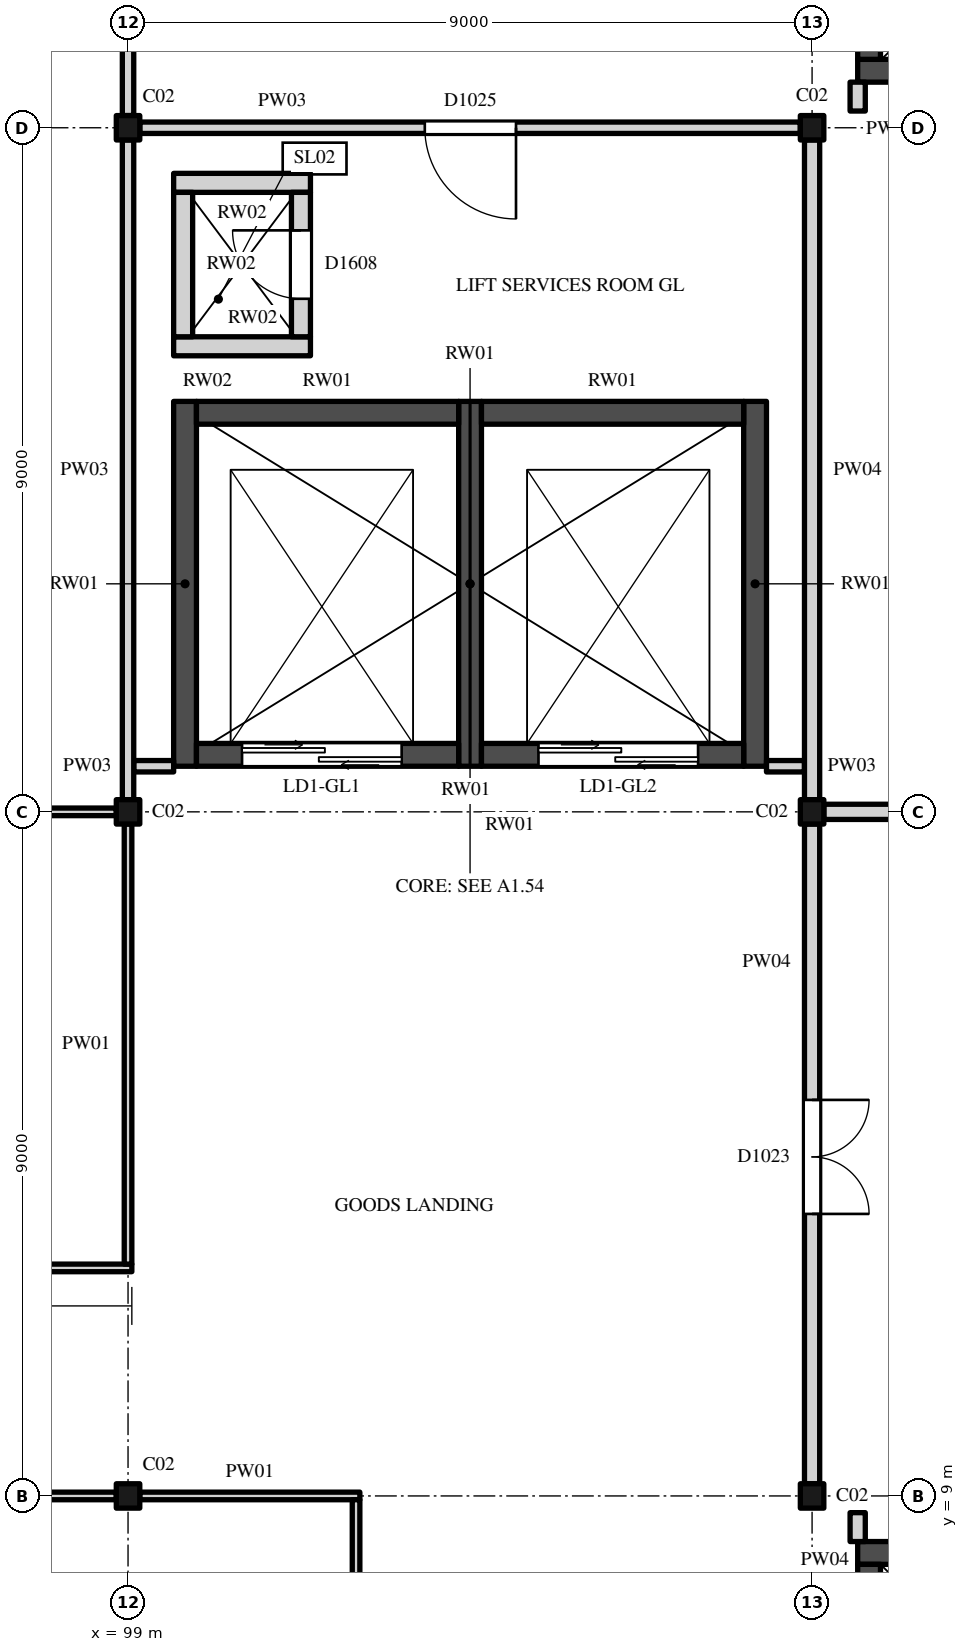
"""IFC4 building model, lengths in metres.
Left out: names, types, materials, properties, quantities, classifications, styles, units other than length and angle.
Written with IfcOpenShell. Run it as: python <this file> out.ifc"""

import sys

from ifc_helpers import new_model, si_unit, direction, frame, frame_2d, origin, origin_2d, place, context, subcontext, project, spatial, rectangle, i_section, extrude, element, fill, save


model = new_model("IFC4")
c1 = context("Model", 3, precision=1e-05, world=origin(), true_north=direction((0.0, 1.0)))
c2 = subcontext(c1, "Body", "Model", "MODEL_VIEW")
j1 = project(units=[si_unit("LENGTHUNIT", "METRE"), si_unit("PLANEANGLEUNIT", "RADIAN")], contexts=[c1])
p1 = place(None, origin())
s1 = spatial("IfcSite", under=j1, at=p1, CompositionType="ELEMENT")
p2 = place(p1, origin())
s2 = spatial("IfcBuilding", under=s1, at=p2, CompositionType="ELEMENT")
p3 = place(p2, frame((0.0, 0.0, 6.0)))
s3 = spatial("IfcBuildingStorey", under=s2, at=p3, CompositionType="ELEMENT", Elevation=6.0)
for number, where, z_axis, x_axis in (
    (1, (99.0, 9.0, 0.0), (0.0, 0.0, 1.0), (1.0, 0.0, 0.0)),
    (2, (108.0, 9.0, 0.0), (0.0, 0.0, 1.0), (1.0, 0.0, 0.0)),
    (3, (99.0, 18.0, 0.0), (0.0, 0.0, 1.0), (1.0, 0.0, 0.0)),
    (4, (108.0, 18.0, 0.0), (0.0, 0.0, 1.0), (1.0, 0.0, 0.0)),
    (5, (99.0, 27.0, 0.0), (0.0, 0.0, 1.0), (1.0, 0.0, 0.0)),
    (6, (108.0, 27.0, 0.0), (0.0, 0.0, 1.0), (1.0, 0.0, 0.0)),
):
    element("IfcColumn", number, at=place(p3, frame(where, z_axis=z_axis, x_axis=x_axis)), inside=s3, PredefinedType="COLUMN", context=c2, shape_type="SweptSolid", body=[
        extrude(i_section(OverallWidth=0.309, OverallDepth=0.321, WebThickness=0.014, FlangeThickness=0.022, FilletRadius=0.017, at=origin_2d()), origin(), (0.0, 0.0, 1.0), 5.0),
    ])
p4 = place(p3, frame((108.6, 8.25, 0.0), z_axis=(0.0, 0.0, 1.0), x_axis=(1.0, 0.0, 0.0)))
e7 = element("IfcWall", 7, at=p4, inside=s3, PredefinedType="SHEAR", context=c2, shape_type="SweptSolid", body=[
    extrude(rectangle(XDim=8.1, YDim=0.3, at=frame_2d((4.05, 0.0))), origin(), (0.0, 0.0, 1.0), 5.0),
])
p5 = place(p3, frame((108.75, 0.3, 0.0), z_axis=(0.0, 0.0, 1.0), x_axis=(0.0, 1.0, 0.0)))
e8 = element("IfcWall", 8, at=p5, inside=s3, PredefinedType="SHEAR", context=c2, shape_type="SweptSolid", body=[
    extrude(rectangle(XDim=7.8, YDim=0.3, at=frame_2d((3.9, 0.0))), origin(), (0.0, 0.0, 1.0), 5.0),
])
p6 = place(p5, frame((3.6, 0.0, 0.0)))
e9 = element("IfcOpeningElement", 9, at=p6, cuts=e8, PredefinedType="OPENING", context=c2, shape_type="SweptSolid", body=[
    extrude(rectangle(XDim=1.2, YDim=2.1, at=frame_2d((0.6, 1.05))), frame((0.0, 0.16, 0.0), z_axis=(0.0, -1.0, 0.0), x_axis=(1.0, 0.0, 0.0)), (0.0, 0.0, 1.0), 0.32),
])
p7 = place(p3, frame((108.6, 27.75, 0.0), z_axis=(0.0, 0.0, 1.0), x_axis=(1.0, 0.0, 0.0)))
e10 = element("IfcWall", 10, at=p7, inside=s3, PredefinedType="SHEAR", context=c2, shape_type="SweptSolid", body=[
    extrude(rectangle(XDim=8.1, YDim=0.3, at=frame_2d((4.05, 0.0))), origin(), (0.0, 0.0, 1.0), 5.0),
])
p8 = place(p3, frame((108.75, 27.9, 0.0), z_axis=(0.0, 0.0, 1.0), x_axis=(0.0, 1.0, 0.0)))
e11 = element("IfcWall", 11, at=p8, inside=s3, PredefinedType="SHEAR", context=c2, shape_type="SweptSolid", body=[
    extrude(rectangle(XDim=7.2, YDim=0.3, at=frame_2d((3.6, 0.0))), origin(), (0.0, 0.0, 1.0), 5.0),
])
p9 = place(p8, frame((3.0, 0.0, 0.0)))
e12 = element("IfcOpeningElement", 12, at=p9, cuts=e11, PredefinedType="OPENING", context=c2, shape_type="SweptSolid", body=[
    extrude(rectangle(XDim=1.2, YDim=2.1, at=frame_2d((0.6, 1.05))), frame((0.0, 0.16, 0.0), z_axis=(0.0, -1.0, 0.0), x_axis=(1.0, 0.0, 0.0)), (0.0, 0.0, 1.0), 0.32),
])
for number, where, z_axis, x_axis in (
    (13, (99.75, 18.6, 0.0), (0.0, 0.0, 1.0), (0.0, 1.0, 0.0)),
    (14, (103.5, 18.6, 0.0), (0.0, 0.0, 1.0), (0.0, 1.0, 0.0)),
    (15, (107.25, 18.6, 0.0), (0.0, 0.0, 1.0), (0.0, 1.0, 0.0)),
):
    element("IfcWall", number, at=place(p3, frame(where, z_axis=z_axis, x_axis=x_axis)), inside=s3, PredefinedType="SHEAR", context=c2, shape_type="SweptSolid", body=[
        extrude(rectangle(XDim=4.8, YDim=0.3, at=frame_2d((2.4, 0.0))), origin(), (0.0, 0.0, 1.0), 5.0),
    ])
p10 = place(p3, frame((99.9, 18.75, 0.0), z_axis=(0.0, 0.0, 1.0), x_axis=(1.0, 0.0, 0.0)))
e16 = element("IfcWall", 16, at=p10, inside=s3, PredefinedType="SHEAR", context=c2, shape_type="SweptSolid", body=[
    extrude(rectangle(XDim=3.45, YDim=0.3, at=frame_2d((1.725, 0.0))), origin(), (0.0, 0.0, 1.0), 5.0),
])
p11 = place(p10, frame((0.6, 0.0, 0.0)))
e17 = element("IfcOpeningElement", 17, at=p11, cuts=e16, PredefinedType="OPENING", context=c2, shape_type="SweptSolid", body=[
    extrude(rectangle(XDim=2.1, YDim=2.4, at=frame_2d((1.05, 1.2))), frame((0.0, 0.16, 0.0), z_axis=(0.0, -1.0, 0.0), x_axis=(1.0, 0.0, 0.0)), (0.0, 0.0, 1.0), 0.32),
])
p12 = place(p3, frame((99.9, 23.25, 0.0), z_axis=(0.0, 0.0, 1.0), x_axis=(1.0, 0.0, 0.0)))
e18 = element("IfcWall", 18, at=p12, inside=s3, PredefinedType="SHEAR", context=c2, shape_type="SweptSolid", body=[
    extrude(rectangle(XDim=3.45, YDim=0.3, at=frame_2d((1.725, 0.0))), origin(), (0.0, 0.0, 1.0), 5.0),
])
p13 = place(p3, frame((103.65, 18.75, 0.0), z_axis=(0.0, 0.0, 1.0), x_axis=(1.0, 0.0, 0.0)))
e19 = element("IfcWall", 19, at=p13, inside=s3, PredefinedType="SHEAR", context=c2, shape_type="SweptSolid", body=[
    extrude(rectangle(XDim=3.45, YDim=0.3, at=frame_2d((1.725, 0.0))), origin(), (0.0, 0.0, 1.0), 5.0),
])
p14 = place(p13, frame((0.75, 0.0, 0.0)))
e20 = element("IfcOpeningElement", 20, at=p14, cuts=e19, PredefinedType="OPENING", context=c2, shape_type="SweptSolid", body=[
    extrude(rectangle(XDim=2.1, YDim=2.4, at=frame_2d((1.05, 1.2))), frame((0.0, 0.16, 0.0), z_axis=(0.0, -1.0, 0.0), x_axis=(1.0, 0.0, 0.0)), (0.0, 0.0, 1.0), 0.32),
])
p15 = place(p3, frame((103.65, 23.25, 0.0), z_axis=(0.0, 0.0, 1.0), x_axis=(1.0, 0.0, 0.0)))
e21 = element("IfcWall", 21, at=p15, inside=s3, PredefinedType="SHEAR", context=c2, shape_type="SweptSolid", body=[
    extrude(rectangle(XDim=3.45, YDim=0.3, at=frame_2d((1.725, 0.0))), origin(), (0.0, 0.0, 1.0), 5.0),
])
for number, where, z_axis, x_axis in (
    (22, (99.6, 24.125, 0.0), (0.0, 0.0, 1.0), (1.0, 0.0, 0.0)),
    (23, (99.6, 26.275, 0.0), (0.0, 0.0, 1.0), (1.0, 0.0, 0.0)),
):
    element("IfcWall", number, at=place(p3, frame(where, z_axis=z_axis, x_axis=x_axis)), inside=s3, PredefinedType="STANDARD", context=c2, shape_type="SweptSolid", body=[
        extrude(rectangle(XDim=1.8, YDim=0.25, at=frame_2d((0.9, 0.0))), origin(), (0.0, 0.0, 1.0), 5.0),
    ])
p16 = place(p3, frame((99.725, 24.25, 0.0), z_axis=(0.0, 0.0, 1.0), x_axis=(0.0, 1.0, 0.0)))
e24 = element("IfcWall", 24, at=p16, inside=s3, PredefinedType="STANDARD", context=c2, shape_type="SweptSolid", body=[
    extrude(rectangle(XDim=1.9, YDim=0.25, at=frame_2d((0.95, 0.0))), origin(), (0.0, 0.0, 1.0), 5.0),
])
p17 = place(p3, frame((101.275, 24.25, 0.0), z_axis=(0.0, 0.0, 1.0), x_axis=(0.0, 1.0, 0.0)))
e25 = element("IfcWall", 25, at=p17, inside=s3, PredefinedType="STANDARD", context=c2, shape_type="SweptSolid", body=[
    extrude(rectangle(XDim=1.9, YDim=0.25, at=frame_2d((0.95, 0.0))), origin(), (0.0, 0.0, 1.0), 5.0),
])
p18 = place(p17, frame((0.5, 0.0, 0.0)))
e26 = element("IfcOpeningElement", 26, at=p18, cuts=e25, PredefinedType="OPENING", context=c2, shape_type="SweptSolid", body=[
    extrude(rectangle(XDim=0.9, YDim=2.1, at=frame_2d((0.45, 1.05))), frame((0.0, 0.135, 0.0), z_axis=(0.0, -1.0, 0.0), x_axis=(1.0, 0.0, 0.0)), (0.0, 0.0, 1.0), 0.27),
])
p19 = place(p3, frame((90.155, 9.0, 0.0), z_axis=(0.0, 0.0, 1.0), x_axis=(1.0, 0.0, 0.0)))
e27 = element("IfcWall", 27, at=p19, inside=s3, PredefinedType="PARTITIONING", context=c2, shape_type="SweptSolid", body=[
    extrude(rectangle(XDim=8.691, YDim=0.1, at=frame_2d((4.345, 0.0))), origin(), (0.0, 0.0, 1.0), 4.419),
])
p20 = place(p19, frame((3.65, 0.0, 0.0)))
e28 = element("IfcOpeningElement", 28, at=p20, cuts=e27, PredefinedType="OPENING", context=c2, shape_type="SweptSolid", body=[
    extrude(rectangle(XDim=1.35, YDim=2.4, at=frame_2d((0.675, 1.2))), frame((0.0, 0.06, 0.0), z_axis=(0.0, -1.0, 0.0), x_axis=(1.0, 0.0, 0.0)), (0.0, 0.0, 1.0), 0.12),
])
p21 = place(p3, frame((99.155, 9.0, 0.0), z_axis=(0.0, 0.0, 1.0), x_axis=(1.0, 0.0, 0.0)))
e29 = element("IfcWall", 29, at=p21, inside=s3, PredefinedType="PARTITIONING", context=c2, shape_type="SweptSolid", body=[
    extrude(rectangle(XDim=2.896, YDim=0.1, at=frame_2d((1.448, 0.0))), origin(), (0.0, 0.0, 1.0), 4.419),
])
p22 = place(p3, frame((63.1, 12.0, 0.0), z_axis=(0.0, 0.0, 1.0), x_axis=(1.0, 0.0, 0.0)))
e30 = element("IfcWall", 30, at=p22, inside=s3, PredefinedType="PARTITIONING", context=c2, shape_type="SweptSolid", body=[
    extrude(rectangle(XDim=35.95, YDim=0.1, at=frame_2d((17.975, 0.0))), origin(), (0.0, 0.0, 1.0), 4.419),
])
p23 = place(p22, frame((8.25, 0.0, 0.0)))
e31 = element("IfcOpeningElement", 31, at=p23, cuts=e30, PredefinedType="OPENING", context=c2, shape_type="SweptSolid", body=[
    extrude(rectangle(XDim=1.35, YDim=2.4, at=frame_2d((0.675, 1.2))), frame((0.0, 0.06, 0.0), z_axis=(0.0, -1.0, 0.0), x_axis=(1.0, 0.0, 0.0)), (0.0, 0.0, 1.0), 0.12),
])
p24 = place(p22, frame((26.25, 0.0, 0.0)))
e32 = element("IfcOpeningElement", 32, at=p24, cuts=e30, PredefinedType="OPENING", context=c2, shape_type="SweptSolid", body=[
    extrude(rectangle(XDim=1.35, YDim=2.4, at=frame_2d((0.675, 1.2))), frame((0.0, 0.06, 0.0), z_axis=(0.0, -1.0, 0.0), x_axis=(1.0, 0.0, 0.0)), (0.0, 0.0, 1.0), 0.12),
])
p25 = place(p3, frame((90.155, 18.0, 0.0), z_axis=(0.0, 0.0, 1.0), x_axis=(1.0, 0.0, 0.0)))
e33 = element("IfcWall", 33, at=p25, inside=s3, PredefinedType="PARTITIONING", context=c2, shape_type="SweptSolid", body=[
    extrude(rectangle(XDim=8.691, YDim=0.1, at=frame_2d((4.345, 0.0))), origin(), (0.0, 0.0, 1.0), 4.419),
])
p26 = place(p3, frame((108.155, 18.0, 0.0), z_axis=(0.0, 0.0, 1.0), x_axis=(1.0, 0.0, 0.0)))
e34 = element("IfcWall", 34, at=p26, inside=s3, PredefinedType="PARTITIONING", context=c2, shape_type="SweptSolid", body=[
    extrude(rectangle(XDim=8.545, YDim=0.2, at=frame_2d((4.273, 0.0))), origin(), (0.0, 0.0, 1.0), 4.419),
])
p27 = place(p26, frame((3.55, 0.0, 0.0)))
e35 = element("IfcOpeningElement", 35, at=p27, cuts=e34, PredefinedType="OPENING", context=c2, shape_type="SweptSolid", body=[
    extrude(rectangle(XDim=1.5, YDim=2.4, at=frame_2d((0.75, 1.2))), frame((0.0, 0.11, 0.0), z_axis=(0.0, -1.0, 0.0), x_axis=(1.0, 0.0, 0.0)), (0.0, 0.0, 1.0), 0.22),
])
p28 = place(p3, frame((99.075, 18.6, 0.0), z_axis=(0.0, 0.0, 1.0), x_axis=(1.0, 0.0, 0.0)))
e36 = element("IfcWall", 36, at=p28, inside=s3, PredefinedType="PARTITIONING", context=c2, shape_type="SweptSolid", body=[
    extrude(rectangle(XDim=0.525, YDim=0.15, at=frame_2d((0.263, 0.0))), origin(), (0.0, 0.0, 1.0), 4.825),
])
p29 = place(p3, frame((107.4, 18.6, 0.0), z_axis=(0.0, 0.0, 1.0), x_axis=(1.0, 0.0, 0.0)))
e37 = element("IfcWall", 37, at=p29, inside=s3, PredefinedType="PARTITIONING", context=c2, shape_type="SweptSolid", body=[
    extrude(rectangle(XDim=0.5, YDim=0.15, at=frame_2d((0.25, 0.0))), origin(), (0.0, 0.0, 1.0), 4.825),
])
p30 = place(p3, frame((99.155, 27.0, 0.0), z_axis=(0.0, 0.0, 1.0), x_axis=(1.0, 0.0, 0.0)))
e38 = element("IfcWall", 38, at=p30, inside=s3, PredefinedType="PARTITIONING", context=c2, shape_type="SweptSolid", body=[
    extrude(rectangle(XDim=8.691, YDim=0.15, at=frame_2d((4.345, 0.0))), origin(), (0.0, 0.0, 1.0), 4.419),
])
p31 = place(p30, frame((3.75, 0.0, 0.0)))
e39 = element("IfcOpeningElement", 39, at=p31, cuts=e38, PredefinedType="OPENING", context=c2, shape_type="SweptSolid", body=[
    extrude(rectangle(XDim=1.2, YDim=2.4, at=frame_2d((0.6, 1.2))), frame((0.0, 0.085, 0.0), z_axis=(0.0, -1.0, 0.0), x_axis=(1.0, 0.0, 0.0)), (0.0, 0.0, 1.0), 0.17),
])
p32 = place(p3, frame((99.0, 12.05, 0.0), z_axis=(0.0, 0.0, 1.0), x_axis=(0.0, 1.0, 0.0)))
e40 = element("IfcWall", 40, at=p32, inside=s3, PredefinedType="PARTITIONING", context=c2, shape_type="SweptSolid", body=[
    extrude(rectangle(XDim=5.79, YDim=0.1, at=frame_2d((2.895, 0.0))), origin(), (0.0, 0.0, 1.0), 4.297),
])
p33 = place(p3, frame((99.0, 18.16, 0.0), z_axis=(0.0, 0.0, 1.0), x_axis=(0.0, 1.0, 0.0)))
e41 = element("IfcWall", 41, at=p33, inside=s3, PredefinedType="PARTITIONING", context=c2, shape_type="SweptSolid", body=[
    extrude(rectangle(XDim=8.679, YDim=0.15, at=frame_2d((4.34, 0.0))), origin(), (0.0, 0.0, 1.0), 4.297),
])
p34 = place(p3, frame((99.0, 27.16, 0.0), z_axis=(0.0, 0.0, 1.0), x_axis=(0.0, 1.0, 0.0)))
e42 = element("IfcWall", 42, at=p34, inside=s3, PredefinedType="PARTITIONING", context=c2, shape_type="SweptSolid", body=[
    extrude(rectangle(XDim=2.765, YDim=0.15, at=frame_2d((1.382, 0.0))), origin(), (0.0, 0.0, 1.0), 4.297),
])
p35 = place(p3, frame((102.0, 0.3, 0.0), z_axis=(0.0, 0.0, 1.0), x_axis=(0.0, 1.0, 0.0)))
e43 = element("IfcWall", 43, at=p35, inside=s3, PredefinedType="PARTITIONING", context=c2, shape_type="SweptSolid", body=[
    extrude(rectangle(XDim=8.65, YDim=0.1, at=frame_2d((4.325, 0.0))), origin(), (0.0, 0.0, 1.0), 4.825),
])
p36 = place(p3, frame((108.0, 9.16, 0.0), z_axis=(0.0, 0.0, 1.0), x_axis=(0.0, 1.0, 0.0)))
e44 = element("IfcWall", 44, at=p36, inside=s3, PredefinedType="PARTITIONING", context=c2, shape_type="SweptSolid", body=[
    extrude(rectangle(XDim=8.679, YDim=0.2, at=frame_2d((4.34, 0.0))), origin(), (0.0, 0.0, 1.0), 4.297),
])
p37 = place(p36, frame((3.55, 0.0, 0.0)))
e45 = element("IfcOpeningElement", 45, at=p37, cuts=e44, PredefinedType="OPENING", context=c2, shape_type="SweptSolid", body=[
    extrude(rectangle(XDim=1.5, YDim=2.4, at=frame_2d((0.75, 1.2))), frame((0.0, 0.11, 0.0), z_axis=(0.0, -1.0, 0.0), x_axis=(1.0, 0.0, 0.0)), (0.0, 0.0, 1.0), 0.22),
])
p38 = place(p3, frame((108.0, 18.16, 0.0), z_axis=(0.0, 0.0, 1.0), x_axis=(0.0, 1.0, 0.0)))
e46 = element("IfcWall", 46, at=p38, inside=s3, PredefinedType="PARTITIONING", context=c2, shape_type="SweptSolid", body=[
    extrude(rectangle(XDim=8.679, YDim=0.2, at=frame_2d((4.34, 0.0))), origin(), (0.0, 0.0, 1.0), 4.297),
])
for number, where, z_axis, x_axis in (
    (47, (108.6, 8.4, 0.0), (0.0, 0.0, 1.0), (0.0, 1.0, 0.0)),
    (48, (108.6, 27.22, 0.0), (0.0, 0.0, 1.0), (0.0, 1.0, 0.0)),
):
    element("IfcWall", number, at=place(p3, frame(where, z_axis=z_axis, x_axis=x_axis)), inside=s3, PredefinedType="PARTITIONING", context=c2, shape_type="SweptSolid", body=[
        extrude(rectangle(XDim=0.38, YDim=0.2, at=frame_2d((0.19, 0.0))), origin(), (0.0, 0.0, 1.0), 4.825),
    ])
p39 = place(p11, origin())
e49 = element("IfcDoor", 49, at=p39, inside=s3, OperationType="DOUBLE_DOOR_SLIDING", PredefinedType="DOOR", context=c2, shape_type="SweptSolid", body=[
    extrude(rectangle(XDim=2.1, YDim=2.4, at=frame_2d((1.05, 1.2))), frame((0.0, 0.025, 0.0), z_axis=(0.0, -1.0, 0.0), x_axis=(1.0, 0.0, 0.0)), (0.0, 0.0, 1.0), 0.05),
])
fill(e17, e49)
p40 = place(p14, origin())
e50 = element("IfcDoor", 50, at=p40, inside=s3, OperationType="DOUBLE_DOOR_SLIDING", PredefinedType="DOOR", context=c2, shape_type="SweptSolid", body=[
    extrude(rectangle(XDim=2.1, YDim=2.4, at=frame_2d((1.05, 1.2))), frame((0.0, 0.025, 0.0), z_axis=(0.0, -1.0, 0.0), x_axis=(1.0, 0.0, 0.0)), (0.0, 0.0, 1.0), 0.05),
])
fill(e20, e50)
p41 = place(p18, origin())
e51 = element("IfcDoor", 51, at=p41, inside=s3, OperationType="SINGLE_SWING_LEFT", PredefinedType="DOOR", context=c2, shape_type="SweptSolid", body=[
    extrude(rectangle(XDim=0.9, YDim=2.1, at=frame_2d((0.45, 1.05))), frame((0.0, 0.025, 0.0), z_axis=(0.0, -1.0, 0.0), x_axis=(1.0, 0.0, 0.0)), (0.0, 0.0, 1.0), 0.05),
])
fill(e26, e51)
p42 = place(p37, origin())
e52 = element("IfcDoor", 52, at=p42, inside=s3, OperationType="DOUBLE_DOOR_SINGLE_SWING", PredefinedType="DOOR", context=c2, shape_type="SweptSolid", body=[
    extrude(rectangle(XDim=1.5, YDim=2.4, at=frame_2d((0.75, 1.2))), frame((0.0, 0.025, 0.0), z_axis=(0.0, -1.0, 0.0), x_axis=(1.0, 0.0, 0.0)), (0.0, 0.0, 1.0), 0.05),
])
fill(e45, e52)
p43 = place(p31, origin())
e53 = element("IfcDoor", 53, at=p43, inside=s3, OperationType="SINGLE_SWING_RIGHT", PredefinedType="DOOR", context=c2, shape_type="SweptSolid", body=[
    extrude(rectangle(XDim=1.2, YDim=2.4, at=frame_2d((0.6, 1.2))), frame((0.0, 0.025, 0.0), z_axis=(0.0, -1.0, 0.0), x_axis=(1.0, 0.0, 0.0)), (0.0, 0.0, 1.0), 0.05),
])
fill(e39, e53)
save(model, sys.argv[1])
